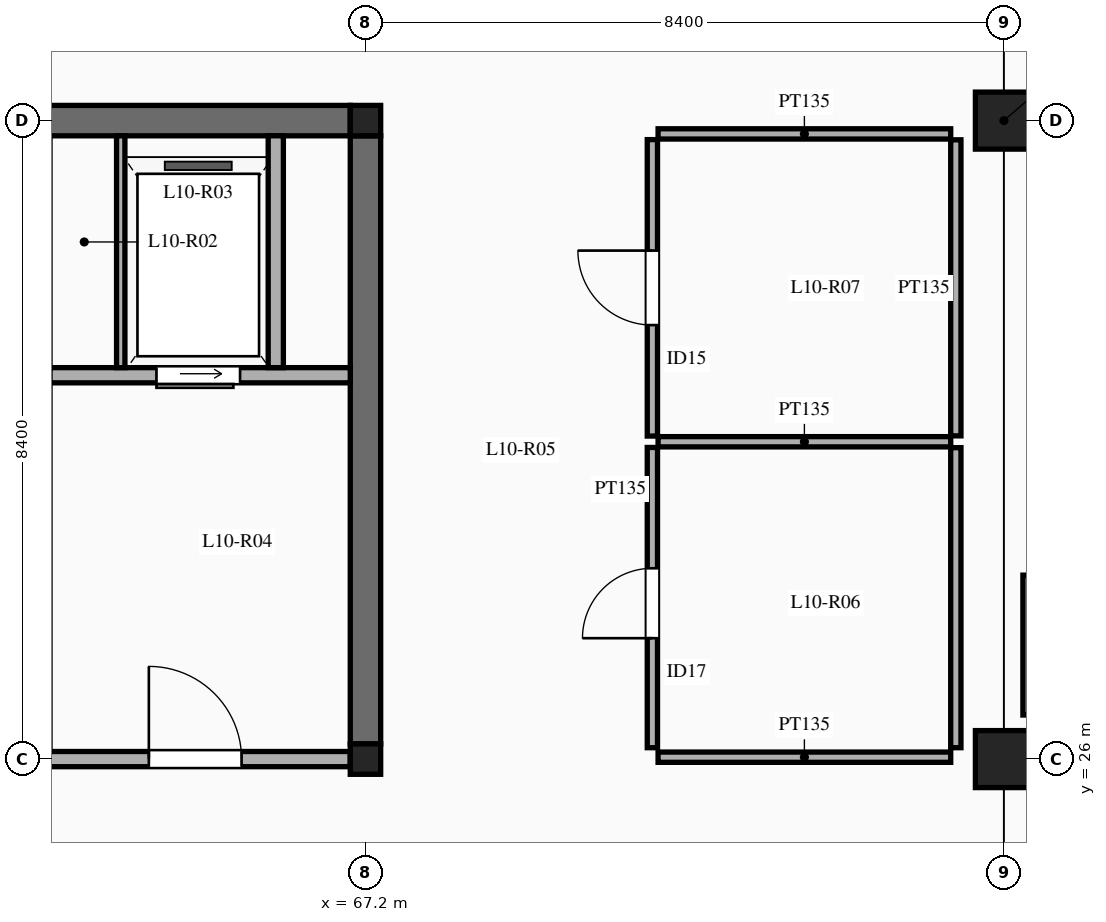
"""IFC4 building model, lengths in metres.
Left out: names, types, materials, properties, quantities, classifications, styles, units other than length and angle.
Written with IfcOpenShell. Run it as: python <this file> out.ifc"""

import sys

from ifc_helpers import new_model, si_unit, direction, frame, frame_2d, origin, origin_2d, place, context, subcontext, project, spatial, rectangle, extrude, element, fill, save


model = new_model("IFC4")
c1 = context("Model", 3, precision=1e-05, world=origin(), true_north=direction((0.0, 1.0)))
c2 = subcontext(c1, "Body", "Model", "MODEL_VIEW")
j1 = project(units=[si_unit("LENGTHUNIT", "METRE"), si_unit("PLANEANGLEUNIT", "RADIAN")], contexts=[c1])
p1 = place(None, origin())
s1 = spatial("IfcSite", under=j1, at=p1, CompositionType="ELEMENT")
p2 = place(p1, origin())
s2 = spatial("IfcBuilding", under=s1, at=p2, CompositionType="ELEMENT")
p3 = place(p2, frame((0.0, 0.0, 46.5)))
s3 = spatial("IfcBuildingStorey", under=s2, at=p3, CompositionType="ELEMENT", Elevation=46.5)
for number, where, z_axis, x_axis in (
    (1, (67.2, 26.0, 0.0), (0.0, 0.0, 1.0), (1.0, 0.0, 0.0)),
    (2, (67.2, 34.4, 0.0), (0.0, 0.0, 1.0), (1.0, 0.0, 0.0)),
):
    element("IfcColumn", number, at=place(p3, frame(where, z_axis=z_axis, x_axis=x_axis)), inside=s3, PredefinedType="COLUMN", context=c2, shape_type="SweptSolid", body=[
        extrude(rectangle(XDim=0.4, YDim=0.4, at=origin_2d()), origin(), (0.0, 0.0, 1.0), 4.5),
    ])
for number, where, z_axis, x_axis in (
    (3, (75.6, 26.0, 0.0), (0.0, 0.0, 1.0), (1.0, 0.0, 0.0)),
    (4, (75.6, 34.4, 0.0), (0.0, 0.0, 1.0), (1.0, 0.0, 0.0)),
):
    element("IfcColumn", number, at=place(p3, frame(where, z_axis=z_axis, x_axis=x_axis)), inside=s3, PredefinedType="COLUMN", context=c2, shape_type="SweptSolid", body=[
        extrude(rectangle(XDim=0.75, YDim=0.75, at=origin_2d()), origin(), (0.0, 0.0, 1.0), 4.5),
    ])
for number, where, z_axis, x_axis in (
    (5, (67.2, 26.2, 0.0), (0.0, 0.0, 1.0), (0.0, 1.0, 0.0)),
    (6, (59.0, 34.4, 0.0), (0.0, 0.0, 1.0), (1.0, 0.0, 0.0)),
):
    element("IfcWall", number, at=place(p3, frame(where, z_axis=z_axis, x_axis=x_axis)), inside=s3, PredefinedType="SHEAR", context=c2, shape_type="SweptSolid", body=[
        extrude(rectangle(XDim=8.0, YDim=0.4, at=frame_2d((4.0, 0.0))), origin(), (0.0, 0.0, 1.0), 4.5),
    ])
p4 = place(p3, frame((59.0, 26.0, 0.0), z_axis=(0.0, 0.0, 1.0), x_axis=(1.0, 0.0, 0.0)))
e7 = element("IfcWall", 7, at=p4, inside=s3, PredefinedType="SOLIDWALL", context=c2, shape_type="SweptSolid", body=[
    extrude(rectangle(XDim=8.0, YDim=0.2, at=frame_2d((4.0, 0.0))), origin(), (0.0, 0.0, 1.0), 3.83),
])
p5 = place(p4, frame((1.55, 0.0, 0.0)))
e8 = element("IfcOpeningElement", 8, at=p5, cuts=e7, PredefinedType="OPENING", context=c2, shape_type="SweptSolid", body=[
    extrude(rectangle(XDim=1.15, YDim=2.15, at=frame_2d((0.575, 1.075))), frame((0.0, 0.11, 0.0), z_axis=(0.0, -1.0, 0.0), x_axis=(1.0, 0.0, 0.0)), (0.0, 0.0, 1.0), 0.22),
])
p6 = place(p4, frame((5.35, 0.0, 0.0)))
e9 = element("IfcOpeningElement", 9, at=p6, cuts=e7, PredefinedType="OPENING", context=c2, shape_type="SweptSolid", body=[
    extrude(rectangle(XDim=1.22, YDim=2.15, at=frame_2d((0.61, 1.075))), frame((0.0, 0.11, 0.0), z_axis=(0.0, -1.0, 0.0), x_axis=(1.0, 0.0, 0.0)), (0.0, 0.0, 1.0), 0.22),
])
p7 = place(p3, frame((63.05, 31.05, 0.0), z_axis=(0.0, 0.0, 1.0), x_axis=(1.0, 0.0, 0.0)))
e10 = element("IfcWall", 10, at=p7, inside=s3, PredefinedType="SOLIDWALL", context=c2, shape_type="SweptSolid", body=[
    extrude(rectangle(XDim=3.95, YDim=0.2, at=frame_2d((1.975, 0.0))), origin(), (0.0, 0.0, 1.0), 4.3),
])
p8 = place(p7, frame((1.4, 0.0, 0.0)))
e11 = element("IfcOpeningElement", 11, at=p8, cuts=e10, PredefinedType="OPENING", context=c2, shape_type="SweptSolid", body=[
    extrude(rectangle(XDim=1.1, YDim=2.15, at=frame_2d((0.55, 1.075))), frame((0.0, 0.11, 0.0), z_axis=(0.0, -1.0, 0.0), x_axis=(1.0, 0.0, 0.0)), (0.0, 0.0, 1.0), 0.22),
])
p9 = place(p3, frame((63.98, 31.15, 0.0), z_axis=(0.0, 0.0, 1.0), x_axis=(0.0, 1.0, 0.0)))
e12 = element("IfcWall", 12, at=p9, inside=s3, PredefinedType="PARTITIONING", context=c2, shape_type="SweptSolid", body=[
    extrude(rectangle(XDim=3.05, YDim=0.11, at=frame_2d((1.525, 0.0))), origin(), (0.0, 0.0, 1.0), 4.3),
])
p10 = place(p3, frame((66.02, 31.15, 0.0), z_axis=(0.0, 0.0, 1.0), x_axis=(0.0, 1.0, 0.0)))
e13 = element("IfcWall", 13, at=p10, inside=s3, PredefinedType="SOLIDWALL", context=c2, shape_type="SweptSolid", body=[
    extrude(rectangle(XDim=3.05, YDim=0.2, at=frame_2d((1.525, 0.0))), origin(), (0.0, 0.0, 1.0), 4.3),
])
p11 = place(p3, frame((75.95, 26.58, 0.0), z_axis=(0.0, 0.0, 1.0), x_axis=(0.0, 1.0, 0.0)))
e14 = element("IfcWall", 14, at=p11, inside=s3, PredefinedType="SOLIDWALL", context=c2, shape_type="SweptSolid", body=[
    extrude(rectangle(XDim=1.84, YDim=0.2, at=frame_2d((0.92, 0.0))), origin(), (0.0, 0.0, 1.0), 4.3),
])
p12 = place(p3, frame((70.975, 26.15, 0.0), z_axis=(0.0, 0.0, 1.0), x_axis=(0.0, 1.0, 0.0)))
e15 = element("IfcWall", 15, at=p12, inside=s3, PredefinedType="PARTITIONING", context=c2, shape_type="SweptSolid", body=[
    extrude(rectangle(XDim=3.95, YDim=0.135, at=frame_2d((1.975, 0.0))), origin(), (0.0, 0.0, 1.0), 3.45),
])
p13 = place(p12, frame((1.441, 0.0, 0.0)))
e16 = element("IfcOpeningElement", 16, at=p13, cuts=e15, PredefinedType="OPENING", context=c2, shape_type="SweptSolid", body=[
    extrude(rectangle(XDim=0.92, YDim=2.12, at=frame_2d((0.46, 1.06))), frame((0.0, 0.077, 0.0), z_axis=(0.0, -1.0, 0.0), x_axis=(1.0, 0.0, 0.0)), (0.0, 0.0, 1.0), 0.155),
])
p14 = place(p3, frame((70.975, 30.25, 0.0), z_axis=(0.0, 0.0, 1.0), x_axis=(0.0, 1.0, 0.0)))
e17 = element("IfcWall", 17, at=p14, inside=s3, PredefinedType="PARTITIONING", context=c2, shape_type="SweptSolid", body=[
    extrude(rectangle(XDim=3.9, YDim=0.135, at=frame_2d((1.95, 0.0))), origin(), (0.0, 0.0, 1.0), 3.45),
])
p15 = place(p14, frame((1.46, 0.0, 0.0)))
e18 = element("IfcOpeningElement", 18, at=p15, cuts=e17, PredefinedType="OPENING", context=c2, shape_type="SweptSolid", body=[
    extrude(rectangle(XDim=0.98, YDim=2.15, at=frame_2d((0.49, 1.075))), frame((0.0, 0.077, 0.0), z_axis=(0.0, -1.0, 0.0), x_axis=(1.0, 0.0, 0.0)), (0.0, 0.0, 1.0), 0.155),
])
for number, where, z_axis, x_axis in (
    (19, (71.05, 30.175, 0.0), (0.0, 0.0, 1.0), (1.0, 0.0, 0.0)),
    (20, (71.05, 26.025, 0.0), (0.0, 0.0, 1.0), (1.0, 0.0, 0.0)),
    (21, (71.05, 34.225, 0.0), (0.0, 0.0, 1.0), (1.0, 0.0, 0.0)),
):
    element("IfcWall", number, at=place(p3, frame(where, z_axis=z_axis, x_axis=x_axis)), inside=s3, PredefinedType="PARTITIONING", context=c2, shape_type="SweptSolid", body=[
        extrude(rectangle(XDim=3.85, YDim=0.135, at=frame_2d((1.925, 0.0))), origin(), (0.0, 0.0, 1.0), 3.45),
    ])
p16 = place(p3, frame((74.968, 26.15, 0.0), z_axis=(0.0, 0.0, 1.0), x_axis=(0.0, 1.0, 0.0)))
e22 = element("IfcWall", 22, at=p16, inside=s3, PredefinedType="PARTITIONING", context=c2, shape_type="SweptSolid", body=[
    extrude(rectangle(XDim=3.948, YDim=0.135, at=frame_2d((1.974, 0.0))), origin(), (0.0, 0.0, 1.0), 3.45),
])
p17 = place(p3, frame((74.968, 30.252, 0.0), z_axis=(0.0, 0.0, 1.0), x_axis=(0.0, 1.0, 0.0)))
e23 = element("IfcWall", 23, at=p17, inside=s3, PredefinedType="PARTITIONING", context=c2, shape_type="SweptSolid", body=[
    extrude(rectangle(XDim=3.895, YDim=0.135, at=frame_2d((1.948, 0.0))), origin(), (0.0, 0.0, 1.0), 3.45),
])
p18 = place(p6, origin())
e24 = element("IfcDoor", 24, at=p18, inside=s3, OperationType="SINGLE_SWING_LEFT", PredefinedType="DOOR", context=c2, shape_type="SweptSolid", body=[
    extrude(rectangle(XDim=1.22, YDim=2.15, at=frame_2d((0.61, 1.075))), frame((0.0, 0.025, 0.0), z_axis=(0.0, -1.0, 0.0), x_axis=(1.0, 0.0, 0.0)), (0.0, 0.0, 1.0), 0.05),
])
fill(e9, e24)
p19 = place(p8, frame((1.1, 0.0, 0.0), z_axis=(0.0, 0.0, 1.0), x_axis=(-1.0, 0.0, 0.0)))
e25 = element("IfcDoor", 25, at=p19, inside=s3, OperationType="SLIDING_TO_LEFT", PredefinedType="DOOR", context=c2, shape_type="SweptSolid", body=[
    extrude(rectangle(XDim=1.1, YDim=2.15, at=frame_2d((0.55, 1.075))), frame((0.0, 0.025, 0.0), z_axis=(0.0, -1.0, 0.0), x_axis=(1.0, 0.0, 0.0)), (0.0, 0.0, 1.0), 0.05),
])
fill(e11, e25)
p20 = place(p13, origin())
e26 = element("IfcDoor", 26, at=p20, inside=s3, OperationType="SINGLE_SWING_LEFT", PredefinedType="DOOR", context=c2, shape_type="SweptSolid", body=[
    extrude(rectangle(XDim=0.92, YDim=2.12, at=frame_2d((0.46, 1.06))), frame((0.0, 0.025, 0.0), z_axis=(0.0, -1.0, 0.0), x_axis=(1.0, 0.0, 0.0)), (0.0, 0.0, 1.0), 0.05),
])
fill(e16, e26)
p21 = place(p15, origin())
e27 = element("IfcDoor", 27, at=p21, inside=s3, OperationType="SINGLE_SWING_RIGHT", PredefinedType="DOOR", context=c2, shape_type="SweptSolid", body=[
    extrude(rectangle(XDim=0.98, YDim=2.15, at=frame_2d((0.49, 1.075))), frame((0.0, 0.025, 0.0), z_axis=(0.0, -1.0, 0.0), x_axis=(1.0, 0.0, 0.0)), (0.0, 0.0, 1.0), 0.05),
])
fill(e18, e27)
save(model, sys.argv[1])
